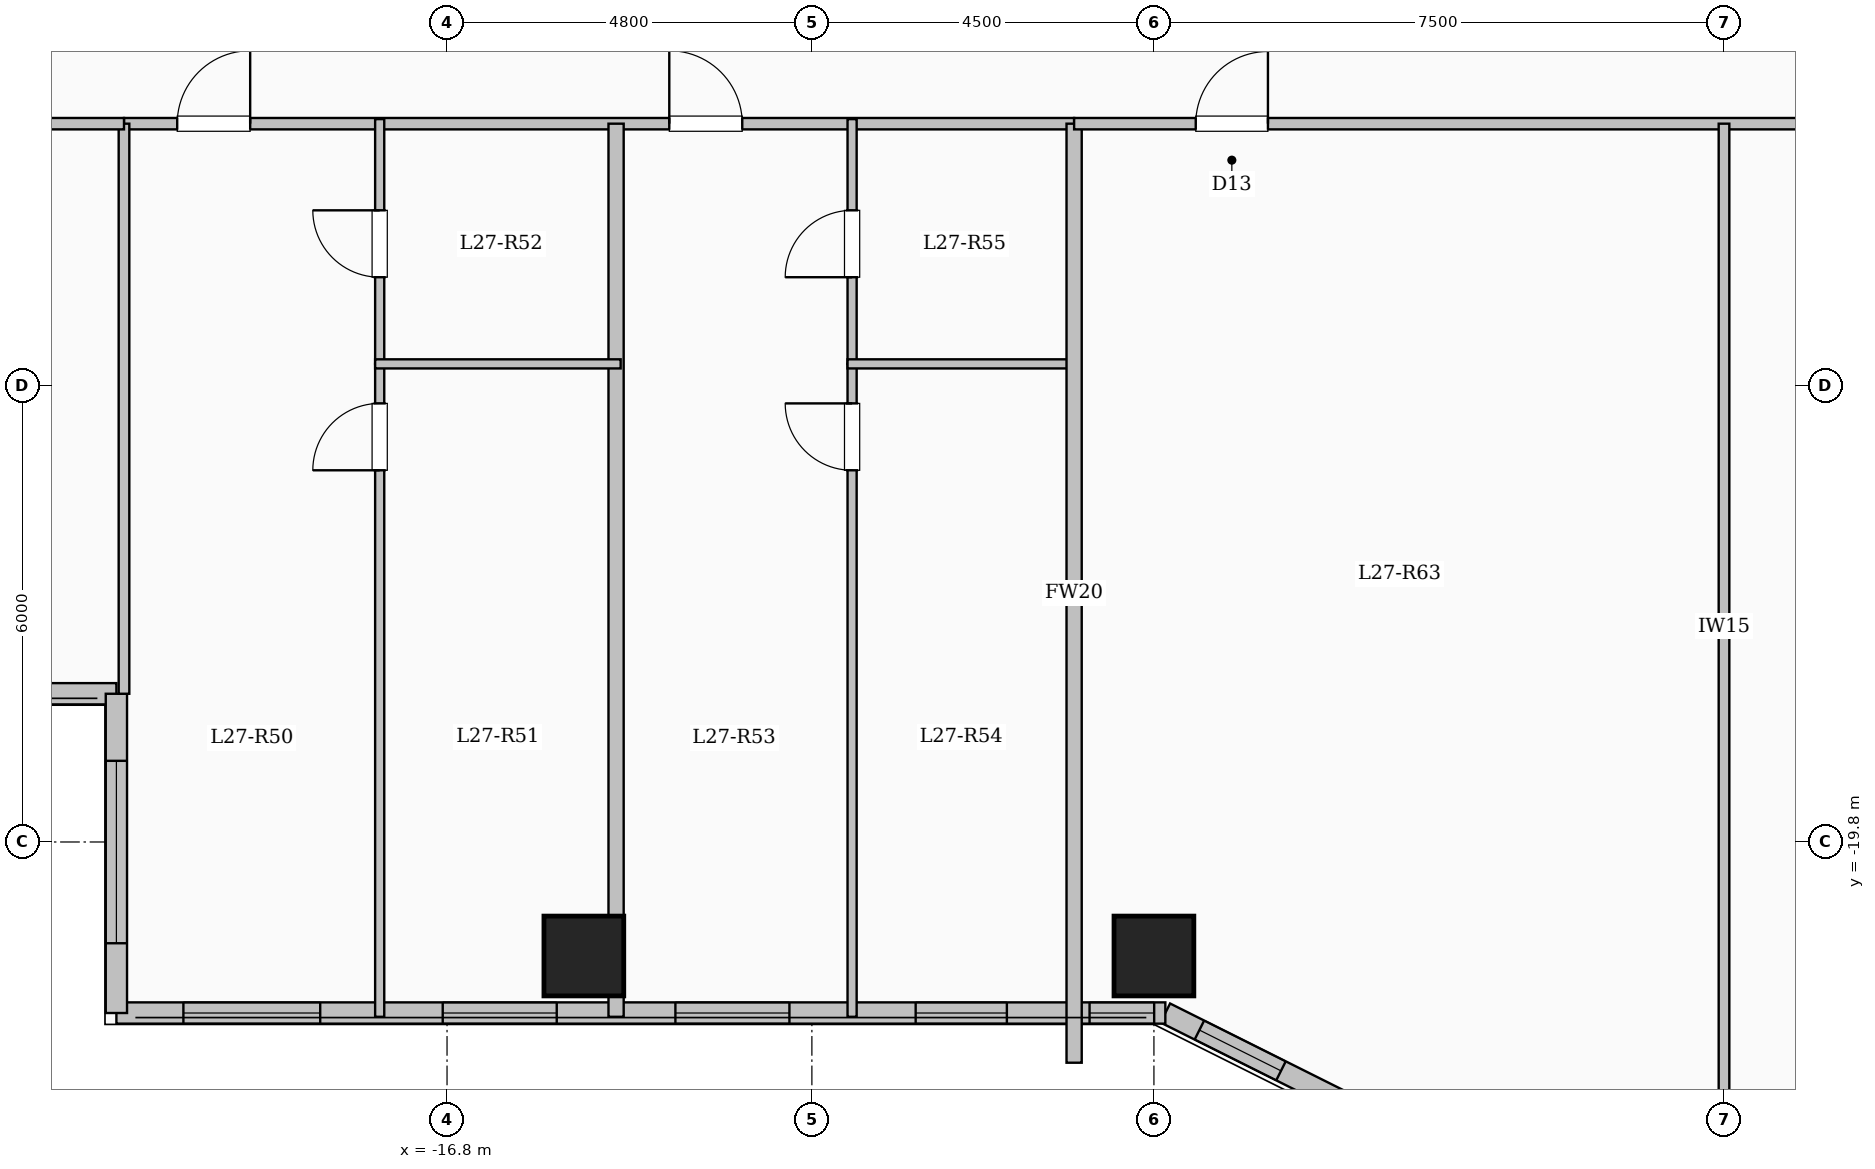
"""IFC4 building model, lengths in metres.
Left out: names, types, materials, properties, quantities, classifications, styles, units other than length and angle.
Written with IfcOpenShell. Run it as: python <this file> out.ifc"""

import sys

from ifc_helpers import new_model, si_unit, direction, frame, frame_2d, origin, origin_2d, place, context, subcontext, project, spatial, rectangle, extrude, element, fill, save


model = new_model("IFC4")
c1 = context("Model", 3, precision=1e-05, world=origin(), true_north=direction((0.0, 1.0)))
c2 = subcontext(c1, "Body", "Model", "MODEL_VIEW")
j1 = project(units=[si_unit("LENGTHUNIT", "METRE"), si_unit("PLANEANGLEUNIT", "RADIAN")], contexts=[c1])
p1 = place(None, origin())
s1 = spatial("IfcSite", under=j1, at=p1, CompositionType="ELEMENT")
p2 = place(p1, origin())
s2 = spatial("IfcBuilding", under=s1, at=p2, CompositionType="ELEMENT")
p3 = place(p2, frame((0.0, 0.0, 101.75)))
s3 = spatial("IfcBuildingStorey", under=s2, at=p3, CompositionType="ELEMENT", Elevation=101.75)
for number, where, z_axis, x_axis in (
    (1, (-15.0, -21.3, 0.0), (0.0, 0.0, 1.0), (1.0, 0.0, 0.0)),
    (2, (-7.5, -21.3, 0.0), (0.0, 0.0, 1.0), (1.0, 0.0, 0.0)),
):
    element("IfcColumn", number, at=place(p3, frame(where, z_axis=z_axis, x_axis=x_axis)), inside=s3, PredefinedType="COLUMN", context=c2, shape_type="SweptSolid", body=[
        extrude(rectangle(XDim=1.05, YDim=1.05, at=origin_2d()), origin(), (0.0, 0.0, 1.0), 3.35),
    ])
p4 = place(p3, frame((-21.15, -17.85, 0.0), z_axis=(0.0, 0.0, 1.0), x_axis=(-1.0, 0.0, 0.0)))
e3 = element("IfcWall", 3, at=p4, inside=s3, PredefinedType="SOLIDWALL", context=c2, shape_type="SweptSolid", body=[
    extrude(rectangle(XDim=5.7, YDim=0.28, at=frame_2d((2.85, 0.0))), origin(), (0.0, 0.0, 1.0), 3.1),
])
p5 = place(p4, frame((1.625, 0.0, 0.9)))
e4 = element("IfcOpeningElement", 4, at=p5, cuts=e3, PredefinedType="OPENING", context=c2, shape_type="SweptSolid", body=[
    extrude(rectangle(XDim=2.4, YDim=1.8, at=frame_2d((1.2, 0.9))), frame((0.0, 0.15, 0.0), z_axis=(0.0, -1.0, 0.0), x_axis=(1.0, 0.0, 0.0)), (0.0, 0.0, 1.0), 0.3),
])
p6 = place(p3, frame((-4.35, -23.55, 0.0), z_axis=(0.0, 0.0, 1.0), x_axis=(-0.894427191, 0.4472135955, 0.0)))
e5 = element("IfcWall", 5, at=p6, inside=s3, PredefinedType="SOLIDWALL", context=c2, shape_type="SweptSolid", body=[
    extrude(rectangle(XDim=3.354, YDim=0.28, at=frame_2d((1.677, 0.0))), origin(), (0.0, 0.0, 1.0), 3.1),
])
p7 = place(p6, frame((1.653, 0.0, 0.95)))
e6 = element("IfcOpeningElement", 6, at=p7, cuts=e5, PredefinedType="OPENING", context=c2, shape_type="SweptSolid", body=[
    extrude(rectangle(XDim=1.2, YDim=1.5, at=frame_2d((0.6, 0.75))), frame((0.0, 0.15, 0.0), z_axis=(0.0, -1.0, 0.0), x_axis=(1.0, 0.0, 0.0)), (0.0, 0.0, 1.0), 0.3),
])
p8 = place(p3, frame((-7.35, -22.05, 0.0), z_axis=(0.0, 0.0, 1.0), x_axis=(-1.0, 0.0, 0.0)))
e7 = element("IfcWall", 7, at=p8, inside=s3, PredefinedType="SOLIDWALL", context=c2, shape_type="SweptSolid", body=[
    extrude(rectangle(XDim=13.8, YDim=0.28, at=frame_2d((6.9, 0.0))), origin(), (0.0, 0.0, 1.0), 3.1),
])
p9 = place(p8, frame((0.147, 0.0, 0.95)))
e8 = element("IfcOpeningElement", 8, at=p9, cuts=e7, PredefinedType="OPENING", context=c2, shape_type="SweptSolid", body=[
    extrude(rectangle(XDim=0.85, YDim=1.5, at=frame_2d((0.425, 0.75))), frame((0.0, 0.15, 0.0), z_axis=(0.0, -1.0, 0.0), x_axis=(1.0, 0.0, 0.0)), (0.0, 0.0, 1.0), 0.3),
])
p10 = place(p8, frame((2.085, 0.0, 0.95)))
e9 = element("IfcOpeningElement", 9, at=p10, cuts=e7, PredefinedType="OPENING", context=c2, shape_type="SweptSolid", body=[
    extrude(rectangle(XDim=1.2, YDim=1.5, at=frame_2d((0.6, 0.75))), frame((0.0, 0.15, 0.0), z_axis=(0.0, -1.0, 0.0), x_axis=(1.0, 0.0, 0.0)), (0.0, 0.0, 1.0), 0.3),
])
p11 = place(p8, frame((4.946, 0.0, 0.9)))
e10 = element("IfcOpeningElement", 10, at=p11, cuts=e7, PredefinedType="OPENING", context=c2, shape_type="SweptSolid", body=[
    extrude(rectangle(XDim=1.5, YDim=1.65, at=frame_2d((0.75, 0.825))), frame((0.0, 0.15, 0.0), z_axis=(0.0, -1.0, 0.0), x_axis=(1.0, 0.0, 0.0)), (0.0, 0.0, 1.0), 0.3),
])
p12 = place(p8, frame((8.007, 0.0, 0.9)))
e11 = element("IfcOpeningElement", 11, at=p12, cuts=e7, PredefinedType="OPENING", context=c2, shape_type="SweptSolid", body=[
    extrude(rectangle(XDim=1.5, YDim=1.65, at=frame_2d((0.75, 0.825))), frame((0.0, 0.15, 0.0), z_axis=(0.0, -1.0, 0.0), x_axis=(1.0, 0.0, 0.0)), (0.0, 0.0, 1.0), 0.3),
])
p13 = place(p8, frame((11.118, 0.0, 0.9)))
e12 = element("IfcOpeningElement", 12, at=p13, cuts=e7, PredefinedType="OPENING", context=c2, shape_type="SweptSolid", body=[
    extrude(rectangle(XDim=1.8, YDim=1.65, at=frame_2d((0.9, 0.825))), frame((0.0, 0.15, 0.0), z_axis=(0.0, -1.0, 0.0), x_axis=(1.0, 0.0, 0.0)), (0.0, 0.0, 1.0), 0.3),
])
p14 = place(p3, frame((-21.15, -22.05, 0.0), z_axis=(0.0, 0.0, 1.0), x_axis=(0.0, 1.0, 0.0)))
e13 = element("IfcWall", 13, at=p14, inside=s3, PredefinedType="SOLIDWALL", context=c2, shape_type="SweptSolid", body=[
    extrude(rectangle(XDim=4.2, YDim=0.28, at=frame_2d((2.1, 0.0))), origin(), (0.0, 0.0, 1.0), 3.1),
])
p15 = place(p14, frame((0.918, 0.0, 0.9)))
e14 = element("IfcOpeningElement", 14, at=p15, cuts=e13, PredefinedType="OPENING", context=c2, shape_type="SweptSolid", body=[
    extrude(rectangle(XDim=2.4, YDim=1.8, at=frame_2d((1.2, 0.9))), frame((0.0, 0.15, 0.0), z_axis=(0.0, -1.0, 0.0), x_axis=(1.0, 0.0, 0.0)), (0.0, 0.0, 1.0), 0.3),
])
p16 = place(p3, frame((-21.05, -10.35, 0.0), z_axis=(0.0, 0.0, 1.0), x_axis=(1.0, 0.0, 0.0)))
e15 = element("IfcWall", 15, at=p16, inside=s3, PredefinedType="PARTITIONING", context=c2, shape_type="SweptSolid", body=[
    extrude(rectangle(XDim=12.5, YDim=0.15, at=frame_2d((6.25, 0.0))), origin(), (0.0, 0.0, 1.0), 3.1),
])
p17 = place(p16, frame((0.7, 0.0, 0.0)))
e16 = element("IfcOpeningElement", 16, at=p17, cuts=e15, PredefinedType="OPENING", context=c2, shape_type="SweptSolid", body=[
    extrude(rectangle(XDim=0.96, YDim=2.15, at=frame_2d((0.48, 1.075))), frame((0.0, 0.085, 0.0), z_axis=(0.0, -1.0, 0.0), x_axis=(1.0, 0.0, 0.0)), (0.0, 0.0, 1.0), 0.17),
])
p18 = place(p16, frame((7.174, 0.0, 0.0)))
e17 = element("IfcOpeningElement", 17, at=p18, cuts=e15, PredefinedType="OPENING", context=c2, shape_type="SweptSolid", body=[
    extrude(rectangle(XDim=0.96, YDim=2.15, at=frame_2d((0.48, 1.075))), frame((0.0, 0.085, 0.0), z_axis=(0.0, -1.0, 0.0), x_axis=(1.0, 0.0, 0.0)), (0.0, 0.0, 1.0), 0.17),
])
p19 = place(p3, frame((-14.576, -22.1, 0.0), z_axis=(0.0, 0.0, 1.0), x_axis=(0.0, 1.0, 0.0)))
e18 = element("IfcWall", 18, at=p19, inside=s3, PredefinedType="SOLIDWALL", context=c2, shape_type="SweptSolid", body=[
    extrude(rectangle(XDim=11.75, YDim=0.2, at=frame_2d((5.875, 0.0))), origin(), (0.0, 0.0, 1.0), 3.1),
])
p20 = place(p3, frame((-17.686, -22.1, 0.0), z_axis=(0.0, 0.0, 1.0), x_axis=(0.0, 1.0, 0.0)))
e19 = element("IfcWall", 19, at=p20, inside=s3, PredefinedType="PARTITIONING", context=c2, shape_type="SweptSolid", body=[
    extrude(rectangle(XDim=8.59, YDim=0.12, at=frame_2d((4.295, 0.0))), origin(), (0.0, 0.0, 1.0), 3.1),
])
p21 = place(p20, frame((7.19, 0.0, 0.0)))
e20 = element("IfcOpeningElement", 20, at=p21, cuts=e19, PredefinedType="OPENING", context=c2, shape_type="SweptSolid", body=[
    extrude(rectangle(XDim=0.88, YDim=2.1, at=frame_2d((0.44, 1.05))), frame((0.0, 0.07, 0.0), z_axis=(0.0, -1.0, 0.0), x_axis=(1.0, 0.0, 0.0)), (0.0, 0.0, 1.0), 0.14),
])
p22 = place(p3, frame((-17.686, -13.51, 0.0), z_axis=(0.0, 0.0, 1.0), x_axis=(0.0, 1.0, 0.0)))
e21 = element("IfcWall", 21, at=p22, inside=s3, PredefinedType="PARTITIONING", context=c2, shape_type="SweptSolid", body=[
    extrude(rectangle(XDim=3.22, YDim=0.12, at=frame_2d((1.61, 0.0))), origin(), (0.0, 0.0, 1.0), 3.1),
])
p23 = place(p22, frame((1.14, 0.0, 0.0)))
e22 = element("IfcOpeningElement", 22, at=p23, cuts=e21, PredefinedType="OPENING", context=c2, shape_type="SweptSolid", body=[
    extrude(rectangle(XDim=0.88, YDim=2.1, at=frame_2d((0.44, 1.05))), frame((0.0, 0.07, 0.0), z_axis=(0.0, -1.0, 0.0), x_axis=(1.0, 0.0, 0.0)), (0.0, 0.0, 1.0), 0.14),
])
p24 = place(p3, frame((-17.746, -13.51, 0.0), z_axis=(0.0, 0.0, 1.0), x_axis=(1.0, 0.0, 0.0)))
e23 = element("IfcWall", 23, at=p24, inside=s3, PredefinedType="PARTITIONING", context=c2, shape_type="SweptSolid", body=[
    extrude(rectangle(XDim=3.23, YDim=0.12, at=frame_2d((1.615, 0.0))), origin(), (0.0, 0.0, 1.0), 3.1),
])
p25 = place(p3, frame((-11.471, -22.1, 0.0), z_axis=(0.0, 0.0, 1.0), x_axis=(0.0, 1.0, 0.0)))
e24 = element("IfcWall", 24, at=p25, inside=s3, PredefinedType="PARTITIONING", context=c2, shape_type="SweptSolid", body=[
    extrude(rectangle(XDim=8.59, YDim=0.12, at=frame_2d((4.295, 0.0))), origin(), (0.0, 0.0, 1.0), 3.1),
])
p26 = place(p25, frame((7.19, 0.0, 0.0)))
e25 = element("IfcOpeningElement", 25, at=p26, cuts=e24, PredefinedType="OPENING", context=c2, shape_type="SweptSolid", body=[
    extrude(rectangle(XDim=0.88, YDim=2.1, at=frame_2d((0.44, 1.05))), frame((0.0, 0.07, 0.0), z_axis=(0.0, -1.0, 0.0), x_axis=(1.0, 0.0, 0.0)), (0.0, 0.0, 1.0), 0.14),
])
p27 = place(p3, frame((-11.471, -13.51, 0.0), z_axis=(0.0, 0.0, 1.0), x_axis=(0.0, 1.0, 0.0)))
e26 = element("IfcWall", 26, at=p27, inside=s3, PredefinedType="PARTITIONING", context=c2, shape_type="SweptSolid", body=[
    extrude(rectangle(XDim=3.22, YDim=0.12, at=frame_2d((1.61, 0.0))), origin(), (0.0, 0.0, 1.0), 3.1),
])
p28 = place(p27, frame((1.14, 0.0, 0.0)))
e27 = element("IfcOpeningElement", 27, at=p28, cuts=e26, PredefinedType="OPENING", context=c2, shape_type="SweptSolid", body=[
    extrude(rectangle(XDim=0.88, YDim=2.1, at=frame_2d((0.44, 1.05))), frame((0.0, 0.07, 0.0), z_axis=(0.0, -1.0, 0.0), x_axis=(1.0, 0.0, 0.0)), (0.0, 0.0, 1.0), 0.14),
])
p29 = place(p3, frame((-11.531, -13.51, 0.0), z_axis=(0.0, 0.0, 1.0), x_axis=(1.0, 0.0, 0.0)))
e28 = element("IfcWall", 28, at=p29, inside=s3, PredefinedType="PARTITIONING", context=c2, shape_type="SweptSolid", body=[
    extrude(rectangle(XDim=2.991, YDim=0.12, at=frame_2d((1.496, 0.0))), origin(), (0.0, 0.0, 1.0), 3.1),
])
p30 = place(p3, frame((-8.55, -22.704, 0.0), z_axis=(0.0, 0.0, 1.0), x_axis=(0.0, 1.0, 0.0)))
e29 = element("IfcWall", 29, at=p30, inside=s3, PredefinedType="SOLIDWALL", context=c2, shape_type="SweptSolid", body=[
    extrude(rectangle(XDim=12.354, YDim=0.2, at=frame_2d((6.177, 0.0))), origin(), (0.0, 0.0, 1.0), 3.1),
])
p31 = place(p3, frame((-8.55, -10.35, 0.0), z_axis=(0.0, 0.0, 1.0), x_axis=(1.0, 0.0, 0.0)))
e30 = element("IfcWall", 30, at=p31, inside=s3, PredefinedType="PARTITIONING", context=c2, shape_type="SweptSolid", body=[
    extrude(rectangle(XDim=17.1, YDim=0.15, at=frame_2d((8.55, 0.0))), origin(), (0.0, 0.0, 1.0), 3.1),
])
p32 = place(p31, frame((1.6, 0.0, 0.0)))
e31 = element("IfcOpeningElement", 31, at=p32, cuts=e30, PredefinedType="OPENING", context=c2, shape_type="SweptSolid", body=[
    extrude(rectangle(XDim=0.95, YDim=2.15, at=frame_2d((0.475, 1.075))), frame((0.0, 0.085, 0.0), z_axis=(0.0, -1.0, 0.0), x_axis=(1.0, 0.0, 0.0)), (0.0, 0.0, 1.0), 0.17),
])
p33 = place(p31, frame((10.5, 0.0, 0.0)))
e32 = element("IfcOpeningElement", 32, at=p33, cuts=e30, PredefinedType="OPENING", context=c2, shape_type="SweptSolid", body=[
    extrude(rectangle(XDim=0.95, YDim=2.15, at=frame_2d((0.475, 1.075))), frame((0.0, 0.085, 0.0), z_axis=(0.0, -1.0, 0.0), x_axis=(1.0, 0.0, 0.0)), (0.0, 0.0, 1.0), 0.17),
])
p34 = place(p3, frame((0.0, -23.58, 0.0), z_axis=(0.0, 0.0, 1.0), x_axis=(0.0, 1.0, 0.0)))
e33 = element("IfcWall", 33, at=p34, inside=s3, PredefinedType="PARTITIONING", context=c2, shape_type="SweptSolid", body=[
    extrude(rectangle(XDim=13.23, YDim=0.14, at=frame_2d((6.615, 0.0))), origin(), (0.0, 0.0, 1.0), 3.1),
])
p35 = place(p3, frame((-21.05, -17.85, 0.0), z_axis=(0.0, 0.0, 1.0), x_axis=(0.0, 1.0, 0.0)))
e34 = element("IfcWall", 34, at=p35, inside=s3, PredefinedType="PARTITIONING", context=c2, shape_type="SweptSolid", body=[
    extrude(rectangle(XDim=7.5, YDim=0.14, at=frame_2d((3.75, 0.0))), origin(), (0.0, 0.0, 1.0), 3.1),
])
p36 = place(p3, frame((-26.88, -10.35, 0.0), z_axis=(0.0, 0.0, 1.0), x_axis=(1.0, 0.0, 0.0)))
e35 = element("IfcWall", 35, at=p36, inside=s3, PredefinedType="PARTITIONING", context=c2, shape_type="SweptSolid", body=[
    extrude(rectangle(XDim=5.83, YDim=0.15, at=frame_2d((2.915, 0.0))), origin(), (0.0, 0.0, 1.0), 3.1),
])
p37 = place(p36, frame((2.44, 0.0, 0.0)))
e36 = element("IfcOpeningElement", 36, at=p37, cuts=e35, PredefinedType="OPENING", context=c2, shape_type="SweptSolid", body=[
    extrude(rectangle(XDim=0.95, YDim=2.15, at=frame_2d((0.475, 1.075))), frame((0.0, 0.085, 0.0), z_axis=(0.0, -1.0, 0.0), x_axis=(1.0, 0.0, 0.0)), (0.0, 0.0, 1.0), 0.17),
])
p38 = place(p7, origin())
e37 = element("IfcWindow", 37, at=p38, inside=s3, PartitioningType="SINGLE_PANEL", PredefinedType="WINDOW", context=c2, shape_type="SweptSolid", body=[
    extrude(rectangle(XDim=1.2, YDim=1.5, at=frame_2d((0.6, 0.75))), frame((0.0, 0.03, 0.0), z_axis=(0.0, -1.0, 0.0), x_axis=(1.0, 0.0, 0.0)), (0.0, 0.0, 1.0), 0.06),
])
fill(e6, e37)
p39 = place(p9, origin())
e38 = element("IfcWindow", 38, at=p39, inside=s3, PartitioningType="SINGLE_PANEL", PredefinedType="WINDOW", context=c2, shape_type="SweptSolid", body=[
    extrude(rectangle(XDim=0.85, YDim=1.5, at=frame_2d((0.425, 0.75))), frame((0.0, 0.03, 0.0), z_axis=(0.0, -1.0, 0.0), x_axis=(1.0, 0.0, 0.0)), (0.0, 0.0, 1.0), 0.06),
])
fill(e8, e38)
p40 = place(p10, origin())
e39 = element("IfcWindow", 39, at=p40, inside=s3, PartitioningType="SINGLE_PANEL", PredefinedType="WINDOW", context=c2, shape_type="SweptSolid", body=[
    extrude(rectangle(XDim=1.2, YDim=1.5, at=frame_2d((0.6, 0.75))), frame((0.0, 0.03, 0.0), z_axis=(0.0, -1.0, 0.0), x_axis=(1.0, 0.0, 0.0)), (0.0, 0.0, 1.0), 0.06),
])
fill(e9, e39)
p41 = place(p11, origin())
e40 = element("IfcWindow", 40, at=p41, inside=s3, PartitioningType="SINGLE_PANEL", PredefinedType="WINDOW", context=c2, shape_type="SweptSolid", body=[
    extrude(rectangle(XDim=1.5, YDim=1.65, at=frame_2d((0.75, 0.825))), frame((0.0, 0.03, 0.0), z_axis=(0.0, -1.0, 0.0), x_axis=(1.0, 0.0, 0.0)), (0.0, 0.0, 1.0), 0.06),
])
fill(e10, e40)
p42 = place(p12, origin())
e41 = element("IfcWindow", 41, at=p42, inside=s3, PartitioningType="SINGLE_PANEL", PredefinedType="WINDOW", context=c2, shape_type="SweptSolid", body=[
    extrude(rectangle(XDim=1.5, YDim=1.65, at=frame_2d((0.75, 0.825))), frame((0.0, 0.03, 0.0), z_axis=(0.0, -1.0, 0.0), x_axis=(1.0, 0.0, 0.0)), (0.0, 0.0, 1.0), 0.06),
])
fill(e11, e41)
p43 = place(p13, origin())
e42 = element("IfcWindow", 42, at=p43, inside=s3, PartitioningType="SINGLE_PANEL", PredefinedType="WINDOW", context=c2, shape_type="SweptSolid", body=[
    extrude(rectangle(XDim=1.8, YDim=1.65, at=frame_2d((0.9, 0.825))), frame((0.0, 0.03, 0.0), z_axis=(0.0, -1.0, 0.0), x_axis=(1.0, 0.0, 0.0)), (0.0, 0.0, 1.0), 0.06),
])
fill(e12, e42)
p44 = place(p15, origin())
e43 = element("IfcWindow", 43, at=p44, inside=s3, PartitioningType="SINGLE_PANEL", PredefinedType="WINDOW", context=c2, shape_type="SweptSolid", body=[
    extrude(rectangle(XDim=2.4, YDim=1.8, at=frame_2d((1.2, 0.9))), frame((0.0, 0.03, 0.0), z_axis=(0.0, -1.0, 0.0), x_axis=(1.0, 0.0, 0.0)), (0.0, 0.0, 1.0), 0.06),
])
fill(e14, e43)
p45 = place(p17, origin())
e44 = element("IfcDoor", 44, at=p45, inside=s3, OperationType="SINGLE_SWING_RIGHT", PredefinedType="DOOR", context=c2, shape_type="SweptSolid", body=[
    extrude(rectangle(XDim=0.96, YDim=2.15, at=frame_2d((0.48, 1.075))), frame((0.0, 0.025, 0.0), z_axis=(0.0, -1.0, 0.0), x_axis=(1.0, 0.0, 0.0)), (0.0, 0.0, 1.0), 0.05),
])
fill(e16, e44)
p46 = place(p21, origin())
e45 = element("IfcDoor", 45, at=p46, inside=s3, OperationType="SINGLE_SWING_LEFT", PredefinedType="DOOR", context=c2, shape_type="SweptSolid", body=[
    extrude(rectangle(XDim=0.88, YDim=2.1, at=frame_2d((0.44, 1.05))), frame((0.0, 0.025, 0.0), z_axis=(0.0, -1.0, 0.0), x_axis=(1.0, 0.0, 0.0)), (0.0, 0.0, 1.0), 0.05),
])
fill(e20, e45)
p47 = place(p23, origin())
e46 = element("IfcDoor", 46, at=p47, inside=s3, OperationType="SINGLE_SWING_RIGHT", PredefinedType="DOOR", context=c2, shape_type="SweptSolid", body=[
    extrude(rectangle(XDim=0.88, YDim=2.1, at=frame_2d((0.44, 1.05))), frame((0.0, 0.025, 0.0), z_axis=(0.0, -1.0, 0.0), x_axis=(1.0, 0.0, 0.0)), (0.0, 0.0, 1.0), 0.05),
])
fill(e22, e46)
p48 = place(p18, origin())
e47 = element("IfcDoor", 47, at=p48, inside=s3, OperationType="SINGLE_SWING_LEFT", PredefinedType="DOOR", context=c2, shape_type="SweptSolid", body=[
    extrude(rectangle(XDim=0.96, YDim=2.15, at=frame_2d((0.48, 1.075))), frame((0.0, 0.025, 0.0), z_axis=(0.0, -1.0, 0.0), x_axis=(1.0, 0.0, 0.0)), (0.0, 0.0, 1.0), 0.05),
])
fill(e17, e47)
p49 = place(p26, origin())
e48 = element("IfcDoor", 48, at=p49, inside=s3, OperationType="SINGLE_SWING_RIGHT", PredefinedType="DOOR", context=c2, shape_type="SweptSolid", body=[
    extrude(rectangle(XDim=0.88, YDim=2.1, at=frame_2d((0.44, 1.05))), frame((0.0, 0.025, 0.0), z_axis=(0.0, -1.0, 0.0), x_axis=(1.0, 0.0, 0.0)), (0.0, 0.0, 1.0), 0.05),
])
fill(e25, e48)
p50 = place(p28, origin())
e49 = element("IfcDoor", 49, at=p50, inside=s3, OperationType="SINGLE_SWING_LEFT", PredefinedType="DOOR", context=c2, shape_type="SweptSolid", body=[
    extrude(rectangle(XDim=0.88, YDim=2.1, at=frame_2d((0.44, 1.05))), frame((0.0, 0.025, 0.0), z_axis=(0.0, -1.0, 0.0), x_axis=(1.0, 0.0, 0.0)), (0.0, 0.0, 1.0), 0.05),
])
fill(e27, e49)
p51 = place(p32, origin())
e50 = element("IfcDoor", 50, at=p51, inside=s3, OperationType="SINGLE_SWING_RIGHT", PredefinedType="DOOR", context=c2, shape_type="SweptSolid", body=[
    extrude(rectangle(XDim=0.95, YDim=2.15, at=frame_2d((0.475, 1.075))), frame((0.0, 0.025, 0.0), z_axis=(0.0, -1.0, 0.0), x_axis=(1.0, 0.0, 0.0)), (0.0, 0.0, 1.0), 0.05),
])
fill(e31, e50)
save(model, sys.argv[1])
